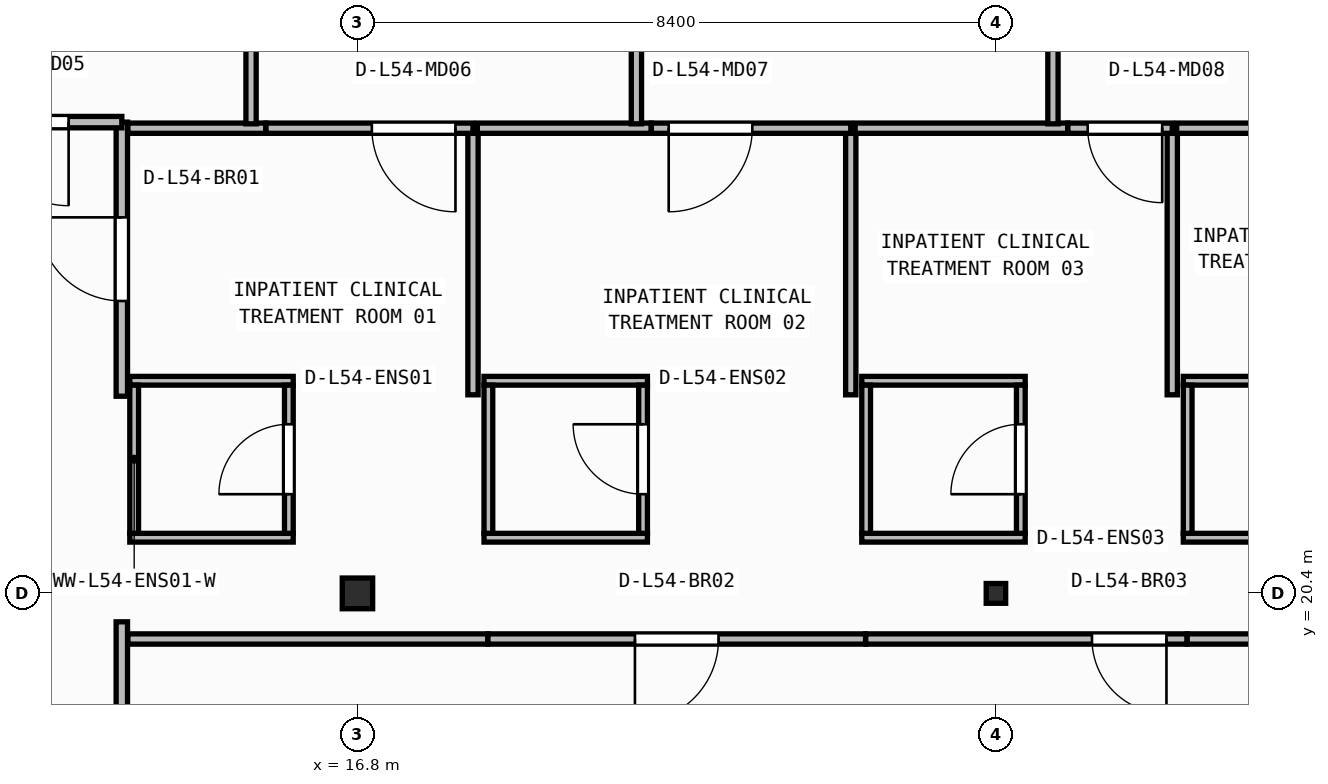
"""IFC4 building model, lengths in metres.
Left out: names, types, materials, properties, quantities, classifications, styles, units other than length and angle.
Written with IfcOpenShell. Run it as: python <this file> out.ifc"""

import sys

from ifc_helpers import new_model, si_unit, direction, frame, frame_2d, origin, origin_2d, place, context, subcontext, project, spatial, rectangle, i_section, extrude, element, fill, save


model = new_model("IFC4")
c1 = context("Model", 3, precision=1e-05, world=origin(), true_north=direction((0.0, 1.0)))
c2 = subcontext(c1, "Body", "Model", "MODEL_VIEW")
j1 = project(units=[si_unit("LENGTHUNIT", "METRE"), si_unit("PLANEANGLEUNIT", "RADIAN")], contexts=[c1])
p1 = place(None, origin())
s1 = spatial("IfcSite", under=j1, at=p1, CompositionType="ELEMENT")
p2 = place(p1, origin())
s2 = spatial("IfcBuilding", under=s1, at=p2, CompositionType="ELEMENT")
p3 = place(p2, frame((0.0, 0.0, 219.75)))
s3 = spatial("IfcBuildingStorey", under=s2, at=p3, CompositionType="ELEMENT", Elevation=219.75)
p4 = place(p3, frame((16.8, 20.4, 0.0), z_axis=(0.0, 0.0, 1.0), x_axis=(1.0, 0.0, 0.0)))
e1 = element("IfcColumn", 1, at=p4, inside=s3, PredefinedType="COLUMN", context=c2, shape_type="SweptSolid", body=[
    extrude(i_section(OverallWidth=0.4, OverallDepth=0.404, WebThickness=0.02, FlangeThickness=0.032, at=origin_2d()), origin(), (0.0, 0.0, 1.0), 3.95),
])
p5 = place(p3, frame((25.2, 20.4, 0.0), z_axis=(0.0, 0.0, 1.0), x_axis=(1.0, 0.0, 0.0)))
e2 = element("IfcColumn", 2, at=p5, inside=s3, PredefinedType="COLUMN", context=c2, shape_type="SweptSolid", body=[
    extrude(i_section(OverallWidth=0.256, OverallDepth=0.26, WebThickness=0.01, FlangeThickness=0.017, FilletRadius=0.013, at=origin_2d()), origin(), (0.0, 0.0, 1.0), 3.95),
])
for number, where, z_axis, x_axis in (
    (3, (13.805, 21.133, 0.0), (0.0, 0.0, 1.0), (1.0, 0.0, 0.0)),
    (4, (13.805, 23.198, 0.0), (0.0, 0.0, 1.0), (1.0, 0.0, 0.0)),
):
    element("IfcWall", number, at=place(p3, frame(where, z_axis=z_axis, x_axis=x_axis)), inside=s3, PredefinedType="PARTITIONING", context=c2, shape_type="SweptSolid", body=[
        extrude(rectangle(XDim=2.15, YDim=0.115, at=frame_2d((1.075, 0.0))), origin(), (0.0, 0.0, 1.0), 3.71),
    ])
p6 = place(p3, frame((13.863, 21.19, 0.0), z_axis=(0.0, 0.0, 1.0), x_axis=(0.0, 1.0, 0.0)))
e5 = element("IfcWall", 5, at=p6, inside=s3, PredefinedType="PARTITIONING", context=c2, shape_type="SweptSolid", body=[
    extrude(rectangle(XDim=1.95, YDim=0.115, at=frame_2d((0.975, 0.0))), origin(), (0.0, 0.0, 1.0), 3.71),
])
p7 = place(p3, frame((15.897, 21.19, 0.0), z_axis=(0.0, 0.0, 1.0), x_axis=(0.0, 1.0, 0.0)))
e6 = element("IfcWall", 6, at=p7, inside=s3, PredefinedType="PARTITIONING", context=c2, shape_type="SweptSolid", body=[
    extrude(rectangle(XDim=1.95, YDim=0.115, at=frame_2d((0.975, 0.0))), origin(), (0.0, 0.0, 1.0), 3.71),
])
p8 = place(p7, frame((0.515, 0.0, 0.0)))
e7 = element("IfcOpeningElement", 7, at=p8, cuts=e6, PredefinedType="OPENING", context=c2, shape_type="SweptSolid", body=[
    extrude(rectangle(XDim=0.92, YDim=2.1, at=frame_2d((0.46, 1.05))), frame((0.0, 0.067, 0.0), z_axis=(0.0, -1.0, 0.0), x_axis=(1.0, 0.0, 0.0)), (0.0, 0.0, 1.0), 0.135),
])
for number, where, z_axis, x_axis in (
    (8, (18.465, 21.133, 0.0), (0.0, 0.0, 1.0), (1.0, 0.0, 0.0)),
    (9, (18.465, 23.198, 0.0), (0.0, 0.0, 1.0), (1.0, 0.0, 0.0)),
):
    element("IfcWall", number, at=place(p3, frame(where, z_axis=z_axis, x_axis=x_axis)), inside=s3, PredefinedType="PARTITIONING", context=c2, shape_type="SweptSolid", body=[
        extrude(rectangle(XDim=2.15, YDim=0.115, at=frame_2d((1.075, 0.0))), origin(), (0.0, 0.0, 1.0), 3.71),
    ])
p9 = place(p3, frame((18.522, 21.19, 0.0), z_axis=(0.0, 0.0, 1.0), x_axis=(0.0, 1.0, 0.0)))
e10 = element("IfcWall", 10, at=p9, inside=s3, PredefinedType="PARTITIONING", context=c2, shape_type="SweptSolid", body=[
    extrude(rectangle(XDim=1.95, YDim=0.115, at=frame_2d((0.975, 0.0))), origin(), (0.0, 0.0, 1.0), 3.71),
])
p10 = place(p3, frame((20.558, 21.19, 0.0), z_axis=(0.0, 0.0, 1.0), x_axis=(0.0, 1.0, 0.0)))
e11 = element("IfcWall", 11, at=p10, inside=s3, PredefinedType="PARTITIONING", context=c2, shape_type="SweptSolid", body=[
    extrude(rectangle(XDim=1.95, YDim=0.115, at=frame_2d((0.975, 0.0))), origin(), (0.0, 0.0, 1.0), 3.71),
])
p11 = place(p10, frame((0.515, 0.0, 0.0)))
e12 = element("IfcOpeningElement", 12, at=p11, cuts=e11, PredefinedType="OPENING", context=c2, shape_type="SweptSolid", body=[
    extrude(rectangle(XDim=0.92, YDim=2.1, at=frame_2d((0.46, 1.05))), frame((0.0, 0.067, 0.0), z_axis=(0.0, -1.0, 0.0), x_axis=(1.0, 0.0, 0.0)), (0.0, 0.0, 1.0), 0.135),
])
for number, where, z_axis, x_axis in (
    (13, (23.435, 21.133, 0.0), (0.0, 0.0, 1.0), (1.0, 0.0, 0.0)),
    (14, (23.435, 23.198, 0.0), (0.0, 0.0, 1.0), (1.0, 0.0, 0.0)),
):
    element("IfcWall", number, at=place(p3, frame(where, z_axis=z_axis, x_axis=x_axis)), inside=s3, PredefinedType="PARTITIONING", context=c2, shape_type="SweptSolid", body=[
        extrude(rectangle(XDim=2.15, YDim=0.115, at=frame_2d((1.075, 0.0))), origin(), (0.0, 0.0, 1.0), 3.71),
    ])
p12 = place(p3, frame((23.492, 21.19, 0.0), z_axis=(0.0, 0.0, 1.0), x_axis=(0.0, 1.0, 0.0)))
e15 = element("IfcWall", 15, at=p12, inside=s3, PredefinedType="PARTITIONING", context=c2, shape_type="SweptSolid", body=[
    extrude(rectangle(XDim=1.95, YDim=0.115, at=frame_2d((0.975, 0.0))), origin(), (0.0, 0.0, 1.0), 3.71),
])
p13 = place(p3, frame((25.528, 21.19, 0.0), z_axis=(0.0, 0.0, 1.0), x_axis=(0.0, 1.0, 0.0)))
e16 = element("IfcWall", 16, at=p13, inside=s3, PredefinedType="PARTITIONING", context=c2, shape_type="SweptSolid", body=[
    extrude(rectangle(XDim=1.95, YDim=0.115, at=frame_2d((0.975, 0.0))), origin(), (0.0, 0.0, 1.0), 3.157),
])
p14 = place(p13, frame((0.515, 0.0, 0.0)))
e17 = element("IfcOpeningElement", 17, at=p14, cuts=e16, PredefinedType="OPENING", context=c2, shape_type="SweptSolid", body=[
    extrude(rectangle(XDim=0.92, YDim=2.1, at=frame_2d((0.46, 1.05))), frame((0.0, 0.067, 0.0), z_axis=(0.0, -1.0, 0.0), x_axis=(1.0, 0.0, 0.0)), (0.0, 0.0, 1.0), 0.135),
])
for number, where, z_axis, x_axis in (
    (18, (27.665, 21.133, 0.0), (0.0, 0.0, 1.0), (1.0, 0.0, 0.0)),
    (19, (27.665, 23.198, 0.0), (0.0, 0.0, 1.0), (1.0, 0.0, 0.0)),
):
    element("IfcWall", number, at=place(p3, frame(where, z_axis=z_axis, x_axis=x_axis)), inside=s3, PredefinedType="PARTITIONING", context=c2, shape_type="SweptSolid", body=[
        extrude(rectangle(XDim=2.15, YDim=0.115, at=frame_2d((1.075, 0.0))), origin(), (0.0, 0.0, 1.0), 3.71),
    ])
p15 = place(p3, frame((27.722, 21.19, 0.0), z_axis=(0.0, 0.0, 1.0), x_axis=(0.0, 1.0, 0.0)))
e20 = element("IfcWall", 20, at=p15, inside=s3, PredefinedType="PARTITIONING", context=c2, shape_type="SweptSolid", body=[
    extrude(rectangle(XDim=1.95, YDim=0.115, at=frame_2d((0.975, 0.0))), origin(), (0.0, 0.0, 1.0), 3.71),
])
p16 = place(p3, frame((13.7, 14.7, 0.0), z_axis=(0.0, 0.0, 1.0), x_axis=(0.0, 1.0, 0.0)))
e21 = element("IfcWall", 21, at=p16, inside=s3, PredefinedType="PARTITIONING", context=c2, shape_type="SweptSolid", body=[
    extrude(rectangle(XDim=5.326, YDim=0.15, at=frame_2d((2.663, 0.0))), origin(), (0.0, 0.0, 1.0), 3.71),
])
p17 = place(p3, frame((13.7, 22.994, 0.0), z_axis=(0.0, 0.0, 1.0), x_axis=(0.0, 1.0, 0.0)))
e22 = element("IfcWall", 22, at=p17, inside=s3, PredefinedType="PARTITIONING", context=c2, shape_type="SweptSolid", body=[
    extrude(rectangle(XDim=3.606, YDim=0.15, at=frame_2d((1.803, 0.0))), origin(), (0.0, 0.0, 1.0), 3.71),
])
p18 = place(p17, frame((1.253, 0.0, 0.0)))
e23 = element("IfcOpeningElement", 23, at=p18, cuts=e22, PredefinedType="OPENING", context=c2, shape_type="SweptSolid", body=[
    extrude(rectangle(XDim=1.1, YDim=2.1, at=frame_2d((0.55, 1.05))), frame((0.0, 0.085, 0.0), z_axis=(0.0, -1.0, 0.0), x_axis=(1.0, 0.0, 0.0)), (0.0, 0.0, 1.0), 0.17),
])
p19 = place(p3, frame((13.7, 26.6, 0.0), z_axis=(0.0, 0.0, 1.0), x_axis=(-1.0, 0.0, 0.0)))
e24 = element("IfcWall", 24, at=p19, inside=s3, PredefinedType="PARTITIONING", context=c2, shape_type="SweptSolid", body=[
    extrude(rectangle(XDim=2.5, YDim=0.15, at=frame_2d((1.25, 0.0))), origin(), (0.0, 0.0, 1.0), 3.71),
])
p20 = place(p19, frame((0.7, 0.0, 0.0)))
e25 = element("IfcOpeningElement", 25, at=p20, cuts=e24, PredefinedType="OPENING", context=c2, shape_type="SweptSolid", body=[
    extrude(rectangle(XDim=1.1, YDim=2.1, at=frame_2d((0.55, 1.05))), frame((0.0, 0.085, 0.0), z_axis=(0.0, -1.0, 0.0), x_axis=(1.0, 0.0, 0.0)), (0.0, 0.0, 1.0), 0.17),
])
p21 = place(p3, frame((18.515, 19.8, 0.0), z_axis=(0.0, 0.0, 1.0), x_axis=(-1.0, 0.0, 0.0)))
e26 = element("IfcWall", 26, at=p21, inside=s3, PredefinedType="PARTITIONING", context=c2, shape_type="SweptSolid", body=[
    extrude(rectangle(XDim=4.735, YDim=0.135, at=frame_2d((2.367, 0.0))), origin(), (0.0, 0.0, 1.0), 3.71),
])
p22 = place(p3, frame((23.485, 19.8, 0.0), z_axis=(0.0, 0.0, 1.0), x_axis=(-1.0, 0.0, 0.0)))
e27 = element("IfcWall", 27, at=p22, inside=s3, PredefinedType="PARTITIONING", context=c2, shape_type="SweptSolid", body=[
    extrude(rectangle(XDim=4.968, YDim=0.135, at=frame_2d((2.484, 0.0))), origin(), (0.0, 0.0, 1.0), 3.71),
])
p23 = place(p22, frame((1.934, 0.0, 0.0)))
e28 = element("IfcOpeningElement", 28, at=p23, cuts=e27, PredefinedType="OPENING", context=c2, shape_type="SweptSolid", body=[
    extrude(rectangle(XDim=1.1, YDim=2.1, at=frame_2d((0.55, 1.05))), frame((0.0, 0.077, 0.0), z_axis=(0.0, -1.0, 0.0), x_axis=(1.0, 0.0, 0.0)), (0.0, 0.0, 1.0), 0.155),
])
p24 = place(p3, frame((27.715, 19.8, 0.0), z_axis=(0.0, 0.0, 1.0), x_axis=(-1.0, 0.0, 0.0)))
e29 = element("IfcWall", 29, at=p24, inside=s3, PredefinedType="PARTITIONING", context=c2, shape_type="SweptSolid", body=[
    extrude(rectangle(XDim=4.228, YDim=0.135, at=frame_2d((2.114, 0.0))), origin(), (0.0, 0.0, 1.0), 3.71),
])
p25 = place(p24, frame((0.271, 0.0, 0.0)))
e30 = element("IfcOpeningElement", 30, at=p25, cuts=e29, PredefinedType="OPENING", context=c2, shape_type="SweptSolid", body=[
    extrude(rectangle(XDim=0.98, YDim=2.1, at=frame_2d((0.49, 1.05))), frame((0.0, 0.077, 0.0), z_axis=(0.0, -1.0, 0.0), x_axis=(1.0, 0.0, 0.0)), (0.0, 0.0, 1.0), 0.155),
])
p26 = place(p3, frame((32.315, 19.8, 0.0), z_axis=(0.0, 0.0, 1.0), x_axis=(-1.0, 0.0, 0.0)))
e31 = element("IfcWall", 31, at=p26, inside=s3, PredefinedType="PARTITIONING", context=c2, shape_type="SweptSolid", body=[
    extrude(rectangle(XDim=4.598, YDim=0.135, at=frame_2d((2.299, 0.0))), origin(), (0.0, 0.0, 1.0), 3.71),
])
p27 = place(p26, frame((2.369, 0.0, 0.0)))
e32 = element("IfcOpeningElement", 32, at=p27, cuts=e31, PredefinedType="OPENING", context=c2, shape_type="SweptSolid", body=[
    extrude(rectangle(XDim=1.1, YDim=2.1, at=frame_2d((0.55, 1.05))), frame((0.0, 0.077, 0.0), z_axis=(0.0, -1.0, 0.0), x_axis=(1.0, 0.0, 0.0)), (0.0, 0.0, 1.0), 0.155),
])
p28 = place(p3, frame((18.32, 23.012, 0.0), z_axis=(0.0, 0.0, 1.0), x_axis=(0.0, 1.0, 0.0)))
e33 = element("IfcWall", 33, at=p28, inside=s3, PredefinedType="PARTITIONING", context=c2, shape_type="SweptSolid", body=[
    extrude(rectangle(XDim=3.508, YDim=0.135, at=frame_2d((1.754, 0.0))), origin(), (0.0, 0.0, 1.0), 3.71),
])
p29 = place(p3, frame((15.594, 26.52, 0.0), z_axis=(0.0, 0.0, 1.0), x_axis=(-1.0, 0.0, 0.0)))
e34 = element("IfcWall", 34, at=p29, inside=s3, PredefinedType="PARTITIONING", context=c2, shape_type="SweptSolid", body=[
    extrude(rectangle(XDim=1.814, YDim=0.135, at=frame_2d((0.907, 0.0))), origin(), (0.0, 0.0, 1.0), 3.71),
])
p30 = place(p3, frame((18.32, 26.52, 0.0), z_axis=(0.0, 0.0, 1.0), x_axis=(-1.0, 0.0, 0.0)))
e35 = element("IfcWall", 35, at=p30, inside=s3, PredefinedType="PARTITIONING", context=c2, shape_type="SweptSolid", body=[
    extrude(rectangle(XDim=2.723, YDim=0.135, at=frame_2d((1.362, 0.0))), origin(), (0.0, 0.0, 1.0), 3.71),
])
p31 = place(p30, frame((0.231, 0.0, 0.0)))
e36 = element("IfcOpeningElement", 36, at=p31, cuts=e35, PredefinedType="OPENING", context=c2, shape_type="SweptSolid", body=[
    extrude(rectangle(XDim=1.1, YDim=2.1, at=frame_2d((0.55, 1.05))), frame((0.0, 0.077, 0.0), z_axis=(0.0, -1.0, 0.0), x_axis=(1.0, 0.0, 0.0)), (0.0, 0.0, 1.0), 0.155),
])
p32 = place(p3, frame((23.29, 23.012, 0.0), z_axis=(0.0, 0.0, 1.0), x_axis=(0.0, 1.0, 0.0)))
e37 = element("IfcWall", 37, at=p32, inside=s3, PredefinedType="PARTITIONING", context=c2, shape_type="SweptSolid", body=[
    extrude(rectangle(XDim=3.508, YDim=0.135, at=frame_2d((1.754, 0.0))), origin(), (0.0, 0.0, 1.0), 3.71),
])
p33 = place(p3, frame((20.665, 26.52, 0.0), z_axis=(0.0, 0.0, 1.0), x_axis=(-1.0, 0.0, 0.0)))
e38 = element("IfcWall", 38, at=p33, inside=s3, PredefinedType="PARTITIONING", context=c2, shape_type="SweptSolid", body=[
    extrude(rectangle(XDim=2.287, YDim=0.135, at=frame_2d((1.144, 0.0))), origin(), (0.0, 0.0, 1.0), 3.71),
])
p34 = place(p3, frame((23.29, 26.52, 0.0), z_axis=(0.0, 0.0, 1.0), x_axis=(-1.0, 0.0, 0.0)))
e39 = element("IfcWall", 39, at=p34, inside=s3, PredefinedType="PARTITIONING", context=c2, shape_type="SweptSolid", body=[
    extrude(rectangle(XDim=2.624, YDim=0.135, at=frame_2d((1.312, 0.0))), origin(), (0.0, 0.0, 1.0), 3.71),
])
p35 = place(p34, frame((1.295, 0.0, 0.0)))
e40 = element("IfcOpeningElement", 40, at=p35, cuts=e39, PredefinedType="OPENING", context=c2, shape_type="SweptSolid", body=[
    extrude(rectangle(XDim=1.1, YDim=2.1, at=frame_2d((0.55, 1.05))), frame((0.0, 0.077, 0.0), z_axis=(0.0, -1.0, 0.0), x_axis=(1.0, 0.0, 0.0)), (0.0, 0.0, 1.0), 0.155),
])
p36 = place(p3, frame((27.52, 23.012, 0.0), z_axis=(0.0, 0.0, 1.0), x_axis=(0.0, 1.0, 0.0)))
e41 = element("IfcWall", 41, at=p36, inside=s3, PredefinedType="PARTITIONING", context=c2, shape_type="SweptSolid", body=[
    extrude(rectangle(XDim=3.508, YDim=0.135, at=frame_2d((1.754, 0.0))), origin(), (0.0, 0.0, 1.0), 3.71),
])
p37 = place(p3, frame((26.145, 26.52, 0.0), z_axis=(0.0, 0.0, 1.0), x_axis=(-1.0, 0.0, 0.0)))
e42 = element("IfcWall", 42, at=p37, inside=s3, PredefinedType="PARTITIONING", context=c2, shape_type="SweptSolid", body=[
    extrude(rectangle(XDim=2.797, YDim=0.135, at=frame_2d((1.398, 0.0))), origin(), (0.0, 0.0, 1.0), 3.71),
])
p38 = place(p3, frame((27.52, 26.52, 0.0), z_axis=(0.0, 0.0, 1.0), x_axis=(-1.0, 0.0, 0.0)))
e43 = element("IfcWall", 43, at=p38, inside=s3, PredefinedType="PARTITIONING", context=c2, shape_type="SweptSolid", body=[
    extrude(rectangle(XDim=1.374, YDim=0.135, at=frame_2d((0.687, 0.0))), origin(), (0.0, 0.0, 1.0), 3.71),
])
p39 = place(p38, frame((0.133, 0.0, 0.0)))
e44 = element("IfcOpeningElement", 44, at=p39, cuts=e43, PredefinedType="OPENING", context=c2, shape_type="SweptSolid", body=[
    extrude(rectangle(XDim=0.98, YDim=2.1, at=frame_2d((0.49, 1.05))), frame((0.0, 0.077, 0.0), z_axis=(0.0, -1.0, 0.0), x_axis=(1.0, 0.0, 0.0)), (0.0, 0.0, 1.0), 0.155),
])
p40 = place(p3, frame((30.815, 26.52, 0.0), z_axis=(0.0, 0.0, 1.0), x_axis=(-1.0, 0.0, 0.0)))
e45 = element("IfcWall", 45, at=p40, inside=s3, PredefinedType="PARTITIONING", context=c2, shape_type="SweptSolid", body=[
    extrude(rectangle(XDim=3.237, YDim=0.135, at=frame_2d((1.619, 0.0))), origin(), (0.0, 0.0, 1.0), 3.71),
])
p41 = place(p3, frame((15.4, 26.577, 0.0), z_axis=(0.0, 0.0, 1.0), x_axis=(0.0, 1.0, 0.0)))
e46 = element("IfcWall", 46, at=p41, inside=s3, PredefinedType="PARTITIONING", context=c2, shape_type="SweptSolid", body=[
    extrude(rectangle(XDim=8.149, YDim=0.135, at=frame_2d((4.075, 0.0))), origin(), (0.0, 0.0, 1.0), 3.71),
])
p42 = place(p3, frame((20.47, 26.577, 0.0), z_axis=(0.0, 0.0, 1.0), x_axis=(0.0, 1.0, 0.0)))
e47 = element("IfcWall", 47, at=p42, inside=s3, PredefinedType="PARTITIONING", context=c2, shape_type="SweptSolid", body=[
    extrude(rectangle(XDim=5.72, YDim=0.135, at=frame_2d((2.86, 0.0))), origin(), (0.0, 0.0, 1.0), 3.71),
])
p43 = place(p3, frame((25.95, 26.577, 0.0), z_axis=(0.0, 0.0, 1.0), x_axis=(0.0, 1.0, 0.0)))
e48 = element("IfcWall", 48, at=p43, inside=s3, PredefinedType="PARTITIONING", context=c2, shape_type="SweptSolid", body=[
    extrude(rectangle(XDim=4.867, YDim=0.135, at=frame_2d((2.433, 0.0))), origin(), (0.0, 0.0, 1.0), 3.71),
])
p44 = place(p8, origin())
e49 = element("IfcDoor", 49, at=p44, inside=s3, OperationType="SINGLE_SWING_LEFT", PredefinedType="DOOR", context=c2, shape_type="SweptSolid", body=[
    extrude(rectangle(XDim=0.92, YDim=2.1, at=frame_2d((0.46, 1.05))), frame((0.0, 0.025, 0.0), z_axis=(0.0, -1.0, 0.0), x_axis=(1.0, 0.0, 0.0)), (0.0, 0.0, 1.0), 0.05),
])
fill(e7, e49)
p45 = place(p11, origin())
e50 = element("IfcDoor", 50, at=p45, inside=s3, OperationType="SINGLE_SWING_RIGHT", PredefinedType="DOOR", context=c2, shape_type="SweptSolid", body=[
    extrude(rectangle(XDim=0.92, YDim=2.1, at=frame_2d((0.46, 1.05))), frame((0.0, 0.025, 0.0), z_axis=(0.0, -1.0, 0.0), x_axis=(1.0, 0.0, 0.0)), (0.0, 0.0, 1.0), 0.05),
])
fill(e12, e50)
p46 = place(p14, origin())
e51 = element("IfcDoor", 51, at=p46, inside=s3, OperationType="SINGLE_SWING_LEFT", PredefinedType="DOOR", context=c2, shape_type="SweptSolid", body=[
    extrude(rectangle(XDim=0.92, YDim=2.1, at=frame_2d((0.46, 1.05))), frame((0.0, 0.025, 0.0), z_axis=(0.0, -1.0, 0.0), x_axis=(1.0, 0.0, 0.0)), (0.0, 0.0, 1.0), 0.05),
])
fill(e17, e51)
p47 = place(p18, origin())
e52 = element("IfcDoor", 52, at=p47, inside=s3, OperationType="SINGLE_SWING_RIGHT", PredefinedType="DOOR", context=c2, shape_type="SweptSolid", body=[
    extrude(rectangle(XDim=1.1, YDim=2.1, at=frame_2d((0.55, 1.05))), frame((0.0, 0.025, 0.0), z_axis=(0.0, -1.0, 0.0), x_axis=(1.0, 0.0, 0.0)), (0.0, 0.0, 1.0), 0.05),
])
fill(e23, e52)
p48 = place(p20, origin())
e53 = element("IfcDoor", 53, at=p48, inside=s3, OperationType="SINGLE_SWING_LEFT", PredefinedType="DOOR", context=c2, shape_type="SweptSolid", body=[
    extrude(rectangle(XDim=1.1, YDim=2.1, at=frame_2d((0.55, 1.05))), frame((0.0, 0.025, 0.0), z_axis=(0.0, -1.0, 0.0), x_axis=(1.0, 0.0, 0.0)), (0.0, 0.0, 1.0), 0.05),
])
fill(e25, e53)
p49 = place(p23, origin())
e54 = element("IfcDoor", 54, at=p49, inside=s3, OperationType="SINGLE_SWING_RIGHT", PredefinedType="DOOR", context=c2, shape_type="SweptSolid", body=[
    extrude(rectangle(XDim=1.1, YDim=2.1, at=frame_2d((0.55, 1.05))), frame((0.0, 0.025, 0.0), z_axis=(0.0, -1.0, 0.0), x_axis=(1.0, 0.0, 0.0)), (0.0, 0.0, 1.0), 0.05),
])
fill(e28, e54)
p50 = place(p25, origin())
e55 = element("IfcDoor", 55, at=p50, inside=s3, OperationType="SINGLE_SWING_LEFT", PredefinedType="DOOR", context=c2, shape_type="SweptSolid", body=[
    extrude(rectangle(XDim=0.98, YDim=2.1, at=frame_2d((0.49, 1.05))), frame((0.0, 0.025, 0.0), z_axis=(0.0, -1.0, 0.0), x_axis=(1.0, 0.0, 0.0)), (0.0, 0.0, 1.0), 0.05),
])
fill(e30, e55)
p51 = place(p31, origin())
e56 = element("IfcDoor", 56, at=p51, inside=s3, OperationType="SINGLE_SWING_LEFT", PredefinedType="DOOR", context=c2, shape_type="SweptSolid", body=[
    extrude(rectangle(XDim=1.1, YDim=2.1, at=frame_2d((0.55, 1.05))), frame((0.0, 0.025, 0.0), z_axis=(0.0, -1.0, 0.0), x_axis=(1.0, 0.0, 0.0)), (0.0, 0.0, 1.0), 0.05),
])
fill(e36, e56)
p52 = place(p35, origin())
e57 = element("IfcDoor", 57, at=p52, inside=s3, OperationType="SINGLE_SWING_RIGHT", PredefinedType="DOOR", context=c2, shape_type="SweptSolid", body=[
    extrude(rectangle(XDim=1.1, YDim=2.1, at=frame_2d((0.55, 1.05))), frame((0.0, 0.025, 0.0), z_axis=(0.0, -1.0, 0.0), x_axis=(1.0, 0.0, 0.0)), (0.0, 0.0, 1.0), 0.05),
])
fill(e40, e57)
p53 = place(p39, origin())
e58 = element("IfcDoor", 58, at=p53, inside=s3, OperationType="SINGLE_SWING_LEFT", PredefinedType="DOOR", context=c2, shape_type="SweptSolid", body=[
    extrude(rectangle(XDim=0.98, YDim=2.1, at=frame_2d((0.49, 1.05))), frame((0.0, 0.025, 0.0), z_axis=(0.0, -1.0, 0.0), x_axis=(1.0, 0.0, 0.0)), (0.0, 0.0, 1.0), 0.05),
])
fill(e44, e58)
save(model, sys.argv[1])
